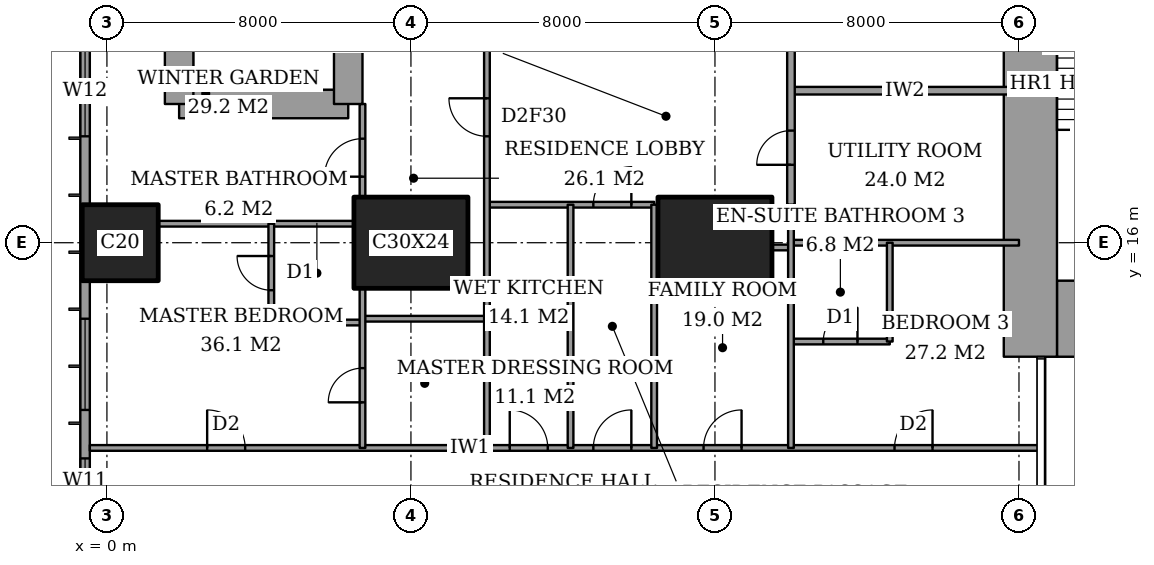
"""IFC4 building model, lengths in metres.
Left out: names, types, materials, properties, quantities, classifications, styles, units other than length and angle.
Written with IfcOpenShell. Run it as: python <this file> out.ifc"""

import sys

from ifc_helpers import new_model, si_unit, direction, frame, frame_2d, origin, origin_2d, place, context, subcontext, project, spatial, rectangle, extrude, element, fill, save


model = new_model("IFC4")
c1 = context("Model", 3, precision=1e-05, world=origin(), true_north=direction((0.0, 1.0)))
c2 = subcontext(c1, "Body", "Model", "MODEL_VIEW")
j1 = project(units=[si_unit("LENGTHUNIT", "METRE"), si_unit("PLANEANGLEUNIT", "RADIAN")], contexts=[c1])
p1 = place(None, origin())
s1 = spatial("IfcSite", under=j1, at=p1, CompositionType="ELEMENT")
p2 = place(p1, origin())
s2 = spatial("IfcBuilding", under=s1, at=p2, CompositionType="ELEMENT")
p3 = place(p2, frame((0.0, 0.0, 135.8)))
s3 = spatial("IfcBuildingStorey", under=s2, at=p3, CompositionType="ELEMENT", Elevation=135.8)
p4 = place(p3, frame((0.35, 16.0, 0.0), z_axis=(0.0, 0.0, 1.0), x_axis=(1.0, 0.0, 0.0)))
e1 = element("IfcColumn", 1, at=p4, inside=s3, PredefinedType="COLUMN", context=c2, shape_type="SweptSolid", body=[
    extrude(rectangle(XDim=2.0, YDim=2.0, at=origin_2d()), origin(), (0.0, 0.0, 1.0), 3.6),
])
for number, where, z_axis, x_axis in (
    (2, (8.0, 16.0, 0.0), (0.0, 0.0, 1.0), (1.0, 0.0, 0.0)),
    (3, (16.0, 16.0, 0.0), (0.0, 0.0, 1.0), (1.0, 0.0, 0.0)),
):
    element("IfcColumn", number, at=place(p3, frame(where, z_axis=z_axis, x_axis=x_axis)), inside=s3, PredefinedType="COLUMN", context=c2, shape_type="SweptSolid", body=[
        extrude(rectangle(XDim=3.0, YDim=2.4, at=origin_2d()), origin(), (0.0, 0.0, 1.0), 3.6),
    ])
p5 = place(p3, frame((25.0, 14.0, 0.0), z_axis=(0.0, 0.0, 1.0), x_axis=(1.0, 0.0, 0.0)))
e4 = element("IfcWall", 4, at=p5, inside=s3, PredefinedType="SHEAR", context=c2, shape_type="SweptSolid", body=[
    extrude(rectangle(XDim=3.15, YDim=2.0, at=frame_2d((1.575, 0.0))), origin(), (0.0, 0.0, 1.0), 3.6),
])
p6 = place(p3, frame((24.3, 13.0, 0.0), z_axis=(0.0, 0.0, 1.0), x_axis=(0.0, 1.0, 0.0)))
e5 = element("IfcWall", 5, at=p6, inside=s3, PredefinedType="SHEAR", context=c2, shape_type="SweptSolid", body=[
    extrude(rectangle(XDim=10.15, YDim=1.4, at=frame_2d((5.075, 0.0))), origin(), (0.0, 0.0, 1.0), 3.6),
])
p7 = place(p3, frame((1.9, 19.65, 0.0), z_axis=(0.0, 0.0, 1.0), x_axis=(1.0, 0.0, 0.0)))
e6 = element("IfcWall", 6, at=p7, inside=s3, PredefinedType="SHEAR", context=c2, shape_type="SweptSolid", body=[
    extrude(rectangle(XDim=4.45, YDim=0.75, at=frame_2d((2.225, 0.0))), origin(), (0.0, 0.0, 1.0), 3.6),
])
p8 = place(p3, frame((6.35, 19.65, 0.0), z_axis=(0.0, 0.0, 1.0), x_axis=(0.0, 1.0, 0.0)))
e7 = element("IfcWall", 7, at=p8, inside=s3, PredefinedType="SHEAR", context=c2, shape_type="SweptSolid", body=[
    extrude(rectangle(XDim=8.7, YDim=0.75, at=frame_2d((4.35, 0.0))), origin(), (0.0, 0.0, 1.0), 3.6),
])
p9 = place(p8, frame((6.725, 0.0, 0.0)))
e8 = element("IfcOpeningElement", 8, at=p9, cuts=e7, PredefinedType="OPENING", context=c2, shape_type="SweptSolid", body=[
    extrude(rectangle(XDim=1.0, YDim=2.1, at=frame_2d((0.5, 1.05))), frame((0.0, 0.385, 0.0), z_axis=(0.0, -1.0, 0.0), x_axis=(1.0, 0.0, 0.0)), (0.0, 0.0, 1.0), 0.77),
])
p10 = place(p3, frame((1.9, 28.35, 0.0), z_axis=(0.0, 0.0, 1.0), x_axis=(0.0, -1.0, 0.0)))
e9 = element("IfcWall", 9, at=p10, inside=s3, PredefinedType="SHEAR", context=c2, shape_type="SweptSolid", body=[
    extrude(rectangle(XDim=8.7, YDim=0.75, at=frame_2d((4.35, 0.0))), origin(), (0.0, 0.0, 1.0), 3.6),
])
p11 = place(p3, frame((-0.575, 44.825, 0.0), z_axis=(0.0, 0.0, 1.0), x_axis=(0.0, -1.0, 0.0)))
e10 = element("IfcWall", 10, at=p11, inside=s3, PredefinedType="SOLIDWALL", context=c2, shape_type="SweptSolid", body=[
    extrude(rectangle(XDim=41.65, YDim=0.25, at=frame_2d((20.825, 0.0))), origin(), (0.0, 0.0, 1.0), 3.6),
])
p12 = place(p11, frame((0.775, 0.0, 0.4)))
e11 = element("IfcOpeningElement", 11, at=p12, cuts=e10, PredefinedType="OPENING", context=c2, shape_type="SweptSolid", body=[
    extrude(rectangle(XDim=2.4, YDim=2.2, at=frame_2d((1.2, 1.1))), frame((0.0, 0.135, 0.0), z_axis=(0.0, -1.0, 0.0), x_axis=(1.0, 0.0, 0.0)), (0.0, 0.0, 1.0), 0.27),
])
p13 = place(p11, frame((6.1, 0.0, 0.4)))
e12 = element("IfcOpeningElement", 12, at=p13, cuts=e10, PredefinedType="OPENING", context=c2, shape_type="SweptSolid", body=[
    extrude(rectangle(XDim=1.2, YDim=2.2, at=frame_2d((0.6, 1.1))), frame((0.0, 0.135, 0.0), z_axis=(0.0, -1.0, 0.0), x_axis=(1.0, 0.0, 0.0)), (0.0, 0.0, 1.0), 0.27),
])
p14 = place(p11, frame((8.425, 0.0, 0.4)))
e13 = element("IfcOpeningElement", 13, at=p14, cuts=e10, PredefinedType="OPENING", context=c2, shape_type="SweptSolid", body=[
    extrude(rectangle(XDim=2.4, YDim=2.2, at=frame_2d((1.2, 1.1))), frame((0.0, 0.135, 0.0), z_axis=(0.0, -1.0, 0.0), x_axis=(1.0, 0.0, 0.0)), (0.0, 0.0, 1.0), 0.27),
])
p15 = place(p11, frame((15.625, 0.0, 0.4)))
e14 = element("IfcOpeningElement", 14, at=p15, cuts=e10, PredefinedType="OPENING", context=c2, shape_type="SweptSolid", body=[
    extrude(rectangle(XDim=2.4, YDim=2.2, at=frame_2d((1.2, 1.1))), frame((0.0, 0.135, 0.0), z_axis=(0.0, -1.0, 0.0), x_axis=(1.0, 0.0, 0.0)), (0.0, 0.0, 1.0), 0.27),
])
p16 = place(p11, frame((23.625, 0.0, 0.4)))
e15 = element("IfcOpeningElement", 15, at=p16, cuts=e10, PredefinedType="OPENING", context=c2, shape_type="SweptSolid", body=[
    extrude(rectangle(XDim=2.4, YDim=2.2, at=frame_2d((1.2, 1.1))), frame((0.0, 0.135, 0.0), z_axis=(0.0, -1.0, 0.0), x_axis=(1.0, 0.0, 0.0)), (0.0, 0.0, 1.0), 0.27),
])
p17 = place(p11, frame((30.825, 0.0, 0.4)))
e16 = element("IfcOpeningElement", 16, at=p17, cuts=e10, PredefinedType="OPENING", context=c2, shape_type="SweptSolid", body=[
    extrude(rectangle(XDim=2.4, YDim=2.2, at=frame_2d((1.2, 1.1))), frame((0.0, 0.135, 0.0), z_axis=(0.0, -1.0, 0.0), x_axis=(1.0, 0.0, 0.0)), (0.0, 0.0, 1.0), 0.27),
])
p18 = place(p11, frame((34.5, 0.0, 0.4)))
e17 = element("IfcOpeningElement", 17, at=p18, cuts=e10, PredefinedType="OPENING", context=c2, shape_type="SweptSolid", body=[
    extrude(rectangle(XDim=1.2, YDim=2.2, at=frame_2d((0.6, 1.1))), frame((0.0, 0.135, 0.0), z_axis=(0.0, -1.0, 0.0), x_axis=(1.0, 0.0, 0.0)), (0.0, 0.0, 1.0), 0.27),
])
p19 = place(p11, frame((38.475, 0.0, 0.4)))
e18 = element("IfcOpeningElement", 18, at=p19, cuts=e10, PredefinedType="OPENING", context=c2, shape_type="SweptSolid", body=[
    extrude(rectangle(XDim=2.4, YDim=2.2, at=frame_2d((1.2, 1.1))), frame((0.0, 0.135, 0.0), z_axis=(0.0, -1.0, 0.0), x_axis=(1.0, 0.0, 0.0)), (0.0, 0.0, 1.0), 0.27),
])
p20 = place(p3, frame((-0.45, 10.6, 0.0), z_axis=(0.0, 0.0, 1.0), x_axis=(1.0, 0.0, 0.0)))
e19 = element("IfcWall", 19, at=p20, inside=s3, PredefinedType="PARTITIONING", context=c2, shape_type="SweptSolid", body=[
    extrude(rectangle(XDim=25.011, YDim=0.15, at=frame_2d((12.505, 0.0))), origin(), (0.0, 0.0, 1.0), 3.35),
])
p21 = place(p20, frame((13.25, 0.0, 0.0)))
e20 = element("IfcOpeningElement", 20, at=p21, cuts=e19, PredefinedType="OPENING", context=c2, shape_type="SweptSolid", body=[
    extrude(rectangle(XDim=1.0, YDim=2.1, at=frame_2d((0.5, 1.05))), frame((0.0, 0.085, 0.0), z_axis=(0.0, -1.0, 0.0), x_axis=(1.0, 0.0, 0.0)), (0.0, 0.0, 1.0), 0.17),
])
p22 = place(p20, frame((3.087, 0.0, 0.0)))
e21 = element("IfcOpeningElement", 21, at=p22, cuts=e19, PredefinedType="OPENING", context=c2, shape_type="SweptSolid", body=[
    extrude(rectangle(XDim=1.0, YDim=2.1, at=frame_2d((0.5, 1.05))), frame((0.0, 0.085, 0.0), z_axis=(0.0, -1.0, 0.0), x_axis=(1.0, 0.0, 0.0)), (0.0, 0.0, 1.0), 0.17),
])
p23 = place(p20, frame((11.05, 0.0, 0.0)))
e22 = element("IfcOpeningElement", 22, at=p23, cuts=e19, PredefinedType="OPENING", context=c2, shape_type="SweptSolid", body=[
    extrude(rectangle(XDim=1.0, YDim=2.1, at=frame_2d((0.5, 1.05))), frame((0.0, 0.085, 0.0), z_axis=(0.0, -1.0, 0.0), x_axis=(1.0, 0.0, 0.0)), (0.0, 0.0, 1.0), 0.17),
])
p24 = place(p20, frame((16.15, 0.0, 0.0)))
e23 = element("IfcOpeningElement", 23, at=p24, cuts=e19, PredefinedType="OPENING", context=c2, shape_type="SweptSolid", body=[
    extrude(rectangle(XDim=1.0, YDim=2.1, at=frame_2d((0.5, 1.05))), frame((0.0, 0.085, 0.0), z_axis=(0.0, -1.0, 0.0), x_axis=(1.0, 0.0, 0.0)), (0.0, 0.0, 1.0), 0.17),
])
p25 = place(p20, frame((21.175, 0.0, 0.0)))
e24 = element("IfcOpeningElement", 24, at=p25, cuts=e19, PredefinedType="OPENING", context=c2, shape_type="SweptSolid", body=[
    extrude(rectangle(XDim=1.0, YDim=2.1, at=frame_2d((0.5, 1.05))), frame((0.0, 0.085, 0.0), z_axis=(0.0, -1.0, 0.0), x_axis=(1.0, 0.0, 0.0)), (0.0, 0.0, 1.0), 0.17),
])
p26 = place(p3, frame((18.0, 13.4, 0.0), z_axis=(0.0, 0.0, 1.0), x_axis=(1.0, 0.0, 0.0)))
e25 = element("IfcWall", 25, at=p26, inside=s3, PredefinedType="PARTITIONING", context=c2, shape_type="SweptSolid", body=[
    extrude(rectangle(XDim=2.6, YDim=0.15, at=frame_2d((1.3, 0.0))), origin(), (0.0, 0.0, 1.0), 3.35),
])
p27 = place(p26, frame((0.85, 0.0, 0.0)))
e26 = element("IfcOpeningElement", 26, at=p27, cuts=e25, PredefinedType="OPENING", context=c2, shape_type="SweptSolid", body=[
    extrude(rectangle(XDim=0.9, YDim=2.1, at=frame_2d((0.45, 1.05))), frame((0.0, 0.085, 0.0), z_axis=(0.0, -1.0, 0.0), x_axis=(1.0, 0.0, 0.0)), (0.0, 0.0, 1.0), 0.17),
])
p28 = place(p3, frame((4.325, 13.9, 0.0), z_axis=(0.0, 0.0, 1.0), x_axis=(1.0, 0.0, 0.0)))
e27 = element("IfcWall", 27, at=p28, inside=s3, PredefinedType="PARTITIONING", context=c2, shape_type="SweptSolid", body=[
    extrude(rectangle(XDim=2.4, YDim=0.15, at=frame_2d((1.2, 0.0))), origin(), (0.0, 0.0, 1.0), 3.35),
])
p29 = place(p3, frame((6.725, 14.0, 0.0), z_axis=(0.0, 0.0, 1.0), x_axis=(1.0, 0.0, 0.0)))
e28 = element("IfcWall", 28, at=p29, inside=s3, PredefinedType="PARTITIONING", context=c2, shape_type="SweptSolid", body=[
    extrude(rectangle(XDim=3.275, YDim=0.15, at=frame_2d((1.637, 0.0))), origin(), (0.0, 0.0, 1.0), 3.35),
])
p30 = place(p3, frame((17.5, 15.875, 0.0), z_axis=(0.0, 0.0, 1.0), x_axis=(1.0, 0.0, 0.0)))
e29 = element("IfcWall", 29, at=p30, inside=s3, PredefinedType="PARTITIONING", context=c2, shape_type="SweptSolid", body=[
    extrude(rectangle(XDim=0.5, YDim=0.15, at=frame_2d((0.25, 0.0))), origin(), (0.0, 0.0, 1.0), 2.634),
])
p31 = place(p3, frame((18.0, 16.0, 0.0), z_axis=(0.0, 0.0, 1.0), x_axis=(1.0, 0.0, 0.0)))
e30 = element("IfcWall", 30, at=p31, inside=s3, PredefinedType="PARTITIONING", context=c2, shape_type="SweptSolid", body=[
    extrude(rectangle(XDim=6.0, YDim=0.15, at=frame_2d((3.0, 0.0))), origin(), (0.0, 0.0, 1.0), 2.634),
])
p32 = place(p3, frame((1.35, 16.5, 0.0), z_axis=(0.0, 0.0, 1.0), x_axis=(1.0, 0.0, 0.0)))
e31 = element("IfcWall", 31, at=p32, inside=s3, PredefinedType="PARTITIONING", context=c2, shape_type="SweptSolid", body=[
    extrude(rectangle(XDim=5.15, YDim=0.15, at=frame_2d((2.575, 0.0))), origin(), (0.0, 0.0, 1.0), 3.35),
])
p33 = place(p3, frame((10.0, 17.0, 0.0), z_axis=(0.0, 0.0, 1.0), x_axis=(1.0, 0.0, 0.0)))
e32 = element("IfcWall", 32, at=p33, inside=s3, PredefinedType="PARTITIONING", context=c2, shape_type="SweptSolid", body=[
    extrude(rectangle(XDim=4.4, YDim=0.15, at=frame_2d((2.2, 0.0))), origin(), (0.0, 0.0, 1.0), 3.35),
])
p34 = place(p33, frame((2.8, 0.0, 0.0)))
e33 = element("IfcOpeningElement", 33, at=p34, cuts=e32, PredefinedType="OPENING", context=c2, shape_type="SweptSolid", body=[
    extrude(rectangle(XDim=1.0, YDim=2.1, at=frame_2d((0.5, 1.05))), frame((0.0, 0.085, 0.0), z_axis=(0.0, -1.0, 0.0), x_axis=(1.0, 0.0, 0.0)), (0.0, 0.0, 1.0), 0.17),
])
p35 = place(p3, frame((18.0, 20.0, 0.0), z_axis=(0.0, 0.0, 1.0), x_axis=(1.0, 0.0, 0.0)))
e34 = element("IfcWall", 34, at=p35, inside=s3, PredefinedType="PARTITIONING", context=c2, shape_type="SweptSolid", body=[
    extrude(rectangle(XDim=6.0, YDim=0.2, at=frame_2d((3.0, 0.0))), origin(), (0.0, 0.0, 1.0), 3.35),
])
p36 = place(p3, frame((4.325, 13.9, 0.0), z_axis=(0.0, 0.0, 1.0), x_axis=(0.0, 1.0, 0.0)))
e35 = element("IfcWall", 35, at=p36, inside=s3, PredefinedType="PARTITIONING", context=c2, shape_type="SweptSolid", body=[
    extrude(rectangle(XDim=2.6, YDim=0.15, at=frame_2d((1.3, 0.0))), origin(), (0.0, 0.0, 1.0), 3.35),
])
p37 = place(p36, frame((0.85, 0.0, 0.0)))
e36 = element("IfcOpeningElement", 36, at=p37, cuts=e35, PredefinedType="OPENING", context=c2, shape_type="SweptSolid", body=[
    extrude(rectangle(XDim=0.9, YDim=2.1, at=frame_2d((0.45, 1.05))), frame((0.0, 0.085, 0.0), z_axis=(0.0, -1.0, 0.0), x_axis=(1.0, 0.0, 0.0)), (0.0, 0.0, 1.0), 0.17),
])
p38 = place(p3, frame((6.725, 10.6, 0.0), z_axis=(0.0, 0.0, 1.0), x_axis=(0.0, 1.0, 0.0)))
e37 = element("IfcWall", 37, at=p38, inside=s3, PredefinedType="PARTITIONING", context=c2, shape_type="SweptSolid", body=[
    extrude(rectangle(XDim=4.2, YDim=0.15, at=frame_2d((2.1, 0.0))), origin(), (0.0, 0.0, 1.0), 3.35),
])
p39 = place(p38, frame((1.2, 0.0, 0.0)))
e38 = element("IfcOpeningElement", 38, at=p39, cuts=e37, PredefinedType="OPENING", context=c2, shape_type="SweptSolid", body=[
    extrude(rectangle(XDim=0.9, YDim=2.1, at=frame_2d((0.45, 1.05))), frame((0.0, 0.085, 0.0), z_axis=(0.0, -1.0, 0.0), x_axis=(1.0, 0.0, 0.0)), (0.0, 0.0, 1.0), 0.17),
])
p40 = place(p3, frame((6.725, 17.2, 0.0), z_axis=(0.0, 0.0, 1.0), x_axis=(0.0, 1.0, 0.0)))
e39 = element("IfcWall", 39, at=p40, inside=s3, PredefinedType="PARTITIONING", context=c2, shape_type="SweptSolid", body=[
    extrude(rectangle(XDim=2.45, YDim=0.15, at=frame_2d((1.225, 0.0))), origin(), (0.0, 0.0, 1.0), 3.35),
])
p41 = place(p40, frame((0.538, 0.0, 0.0)))
e40 = element("IfcOpeningElement", 40, at=p41, cuts=e39, PredefinedType="OPENING", context=c2, shape_type="SweptSolid", body=[
    extrude(rectangle(XDim=1.0, YDim=2.1, at=frame_2d((0.5, 1.05))), frame((0.0, 0.085, 0.0), z_axis=(0.0, -1.0, 0.0), x_axis=(1.0, 0.0, 0.0)), (0.0, 0.0, 1.0), 0.17),
])
p42 = place(p3, frame((10.0, 10.6, 0.0), z_axis=(0.0, 0.0, 1.0), x_axis=(0.0, 1.0, 0.0)))
e41 = element("IfcWall", 41, at=p42, inside=s3, PredefinedType="PARTITIONING", context=c2, shape_type="SweptSolid", body=[
    extrude(rectangle(XDim=11.0, YDim=0.15, at=frame_2d((5.5, 0.0))), origin(), (0.0, 0.0, 1.0), 3.35),
])
p43 = place(p42, frame((8.2, 0.0, 0.0)))
e42 = element("IfcOpeningElement", 42, at=p43, cuts=e41, PredefinedType="OPENING", context=c2, shape_type="SweptSolid", body=[
    extrude(rectangle(XDim=1.0, YDim=2.1, at=frame_2d((0.5, 1.05))), frame((0.0, 0.085, 0.0), z_axis=(0.0, -1.0, 0.0), x_axis=(1.0, 0.0, 0.0)), (0.0, 0.0, 1.0), 0.17),
])
for number, where, z_axis, x_axis in (
    (43, (12.2, 10.6, 0.0), (0.0, 0.0, 1.0), (0.0, 1.0, 0.0)),
    (44, (14.4, 10.6, 0.0), (0.0, 0.0, 1.0), (0.0, 1.0, 0.0)),
):
    element("IfcWall", number, at=place(p3, frame(where, z_axis=z_axis, x_axis=x_axis)), inside=s3, PredefinedType="PARTITIONING", context=c2, shape_type="SweptSolid", body=[
        extrude(rectangle(XDim=6.4, YDim=0.15, at=frame_2d((3.2, 0.0))), origin(), (0.0, 0.0, 1.0), 3.35),
    ])
p44 = place(p3, frame((18.0, 17.0, 0.0), z_axis=(0.0, 0.0, 1.0), x_axis=(0.0, 1.0, 0.0)))
e45 = element("IfcWall", 45, at=p44, inside=s3, PredefinedType="PARTITIONING", context=c2, shape_type="SweptSolid", body=[
    extrude(rectangle(XDim=7.0, YDim=0.2, at=frame_2d((3.5, 0.0))), origin(), (0.0, 0.0, 1.0), 3.35),
])
p45 = place(p44, frame((4.4, 0.0, 0.0)))
e46 = element("IfcOpeningElement", 46, at=p45, cuts=e45, PredefinedType="OPENING", context=c2, shape_type="SweptSolid", body=[
    extrude(rectangle(XDim=1.2, YDim=2.4, at=frame_2d((0.6, 1.2))), frame((0.0, 0.11, 0.0), z_axis=(0.0, -1.0, 0.0), x_axis=(1.0, 0.0, 0.0)), (0.0, 0.0, 1.0), 0.22),
])
p46 = place(p44, frame((1.05, 0.0, 0.0)))
e47 = element("IfcOpeningElement", 47, at=p46, cuts=e45, PredefinedType="OPENING", context=c2, shape_type="SweptSolid", body=[
    extrude(rectangle(XDim=0.9, YDim=2.1, at=frame_2d((0.45, 1.05))), frame((0.0, 0.11, 0.0), z_axis=(0.0, -1.0, 0.0), x_axis=(1.0, 0.0, 0.0)), (0.0, 0.0, 1.0), 0.22),
])
p47 = place(p3, frame((18.0, 10.6, 0.0), z_axis=(0.0, 0.0, 1.0), x_axis=(0.0, 1.0, 0.0)))
e48 = element("IfcWall", 48, at=p47, inside=s3, PredefinedType="PARTITIONING", context=c2, shape_type="SweptSolid", body=[
    extrude(rectangle(XDim=6.4, YDim=0.15, at=frame_2d((3.2, 0.0))), origin(), (0.0, 0.0, 1.0), 3.35),
])
p48 = place(p3, frame((20.6, 13.4, 0.0), z_axis=(0.0, 0.0, 1.0), x_axis=(0.0, 1.0, 0.0)))
e49 = element("IfcWall", 49, at=p48, inside=s3, PredefinedType="PARTITIONING", context=c2, shape_type="SweptSolid", body=[
    extrude(rectangle(XDim=2.6, YDim=0.15, at=frame_2d((1.3, 0.0))), origin(), (0.0, 0.0, 1.0), 3.35),
])
p49 = place(p16, origin())
e50 = element("IfcWindow", 50, at=p49, inside=s3, PartitioningType="SINGLE_PANEL", PredefinedType="WINDOW", context=c2, shape_type="SweptSolid", body=[
    extrude(rectangle(XDim=2.4, YDim=2.2, at=frame_2d((1.2, 1.1))), frame((0.0, 0.03, 0.0), z_axis=(0.0, -1.0, 0.0), x_axis=(1.0, 0.0, 0.0)), (0.0, 0.0, 1.0), 0.06),
])
fill(e15, e50)
p50 = place(p17, origin())
e51 = element("IfcWindow", 51, at=p50, inside=s3, PartitioningType="SINGLE_PANEL", PredefinedType="WINDOW", context=c2, shape_type="SweptSolid", body=[
    extrude(rectangle(XDim=2.4, YDim=2.2, at=frame_2d((1.2, 1.1))), frame((0.0, 0.03, 0.0), z_axis=(0.0, -1.0, 0.0), x_axis=(1.0, 0.0, 0.0)), (0.0, 0.0, 1.0), 0.06),
])
fill(e16, e51)
p51 = place(p18, origin())
e52 = element("IfcWindow", 52, at=p51, inside=s3, PartitioningType="SINGLE_PANEL", PredefinedType="WINDOW", context=c2, shape_type="SweptSolid", body=[
    extrude(rectangle(XDim=1.2, YDim=2.2, at=frame_2d((0.6, 1.1))), frame((0.0, 0.03, 0.0), z_axis=(0.0, -1.0, 0.0), x_axis=(1.0, 0.0, 0.0)), (0.0, 0.0, 1.0), 0.06),
])
fill(e17, e52)
p52 = place(p21, origin())
e53 = element("IfcDoor", 53, at=p52, inside=s3, OperationType="SINGLE_SWING_LEFT", PredefinedType="DOOR", context=c2, shape_type="SweptSolid", body=[
    extrude(rectangle(XDim=1.0, YDim=2.1, at=frame_2d((0.5, 1.05))), frame((0.0, 0.025, 0.0), z_axis=(0.0, -1.0, 0.0), x_axis=(1.0, 0.0, 0.0)), (0.0, 0.0, 1.0), 0.05),
])
fill(e20, e53)
p53 = place(p37, origin())
e54 = element("IfcDoor", 54, at=p53, inside=s3, OperationType="SINGLE_SWING_LEFT", PredefinedType="DOOR", context=c2, shape_type="SweptSolid", body=[
    extrude(rectangle(XDim=0.9, YDim=2.1, at=frame_2d((0.45, 1.05))), frame((0.0, 0.025, 0.0), z_axis=(0.0, -1.0, 0.0), x_axis=(1.0, 0.0, 0.0)), (0.0, 0.0, 1.0), 0.05),
])
fill(e36, e54)
p54 = place(p22, origin())
e55 = element("IfcDoor", 55, at=p54, inside=s3, OperationType="SINGLE_SWING_RIGHT", PredefinedType="DOOR", context=c2, shape_type="SweptSolid", body=[
    extrude(rectangle(XDim=1.0, YDim=2.1, at=frame_2d((0.5, 1.05))), frame((0.0, 0.025, 0.0), z_axis=(0.0, -1.0, 0.0), x_axis=(1.0, 0.0, 0.0)), (0.0, 0.0, 1.0), 0.05),
])
fill(e21, e55)
p55 = place(p41, origin())
e56 = element("IfcDoor", 56, at=p55, inside=s3, OperationType="SINGLE_SWING_RIGHT", PredefinedType="DOOR", context=c2, shape_type="SweptSolid", body=[
    extrude(rectangle(XDim=1.0, YDim=2.1, at=frame_2d((0.5, 1.05))), frame((0.0, 0.025, 0.0), z_axis=(0.0, -1.0, 0.0), x_axis=(1.0, 0.0, 0.0)), (0.0, 0.0, 1.0), 0.05),
])
fill(e40, e56)
p56 = place(p39, origin())
e57 = element("IfcDoor", 57, at=p56, inside=s3, OperationType="SINGLE_SWING_RIGHT", PredefinedType="DOOR", context=c2, shape_type="SweptSolid", body=[
    extrude(rectangle(XDim=0.9, YDim=2.1, at=frame_2d((0.45, 1.05))), frame((0.0, 0.025, 0.0), z_axis=(0.0, -1.0, 0.0), x_axis=(1.0, 0.0, 0.0)), (0.0, 0.0, 1.0), 0.05),
])
fill(e38, e57)
p57 = place(p43, origin())
e58 = element("IfcDoor", 58, at=p57, inside=s3, OperationType="SINGLE_SWING_LEFT", PredefinedType="DOOR", context=c2, shape_type="SweptSolid", body=[
    extrude(rectangle(XDim=1.0, YDim=2.1, at=frame_2d((0.5, 1.05))), frame((0.0, 0.025, 0.0), z_axis=(0.0, -1.0, 0.0), x_axis=(1.0, 0.0, 0.0)), (0.0, 0.0, 1.0), 0.05),
])
fill(e42, e58)
p58 = place(p23, origin())
e59 = element("IfcDoor", 59, at=p58, inside=s3, OperationType="SINGLE_SWING_RIGHT", PredefinedType="DOOR", context=c2, shape_type="SweptSolid", body=[
    extrude(rectangle(XDim=1.0, YDim=2.1, at=frame_2d((0.5, 1.05))), frame((0.0, 0.025, 0.0), z_axis=(0.0, -1.0, 0.0), x_axis=(1.0, 0.0, 0.0)), (0.0, 0.0, 1.0), 0.05),
])
fill(e22, e59)
p59 = place(p34, origin())
e60 = element("IfcDoor", 60, at=p59, inside=s3, OperationType="SINGLE_SWING_LEFT", PredefinedType="DOOR", context=c2, shape_type="SweptSolid", body=[
    extrude(rectangle(XDim=1.0, YDim=2.1, at=frame_2d((0.5, 1.05))), frame((0.0, 0.025, 0.0), z_axis=(0.0, -1.0, 0.0), x_axis=(1.0, 0.0, 0.0)), (0.0, 0.0, 1.0), 0.05),
])
fill(e33, e60)
p60 = place(p24, origin())
e61 = element("IfcDoor", 61, at=p60, inside=s3, OperationType="SINGLE_SWING_LEFT", PredefinedType="DOOR", context=c2, shape_type="SweptSolid", body=[
    extrude(rectangle(XDim=1.0, YDim=2.1, at=frame_2d((0.5, 1.05))), frame((0.0, 0.025, 0.0), z_axis=(0.0, -1.0, 0.0), x_axis=(1.0, 0.0, 0.0)), (0.0, 0.0, 1.0), 0.05),
])
fill(e23, e61)
p61 = place(p27, origin())
e62 = element("IfcDoor", 62, at=p61, inside=s3, OperationType="SINGLE_SWING_LEFT", PredefinedType="DOOR", context=c2, shape_type="SweptSolid", body=[
    extrude(rectangle(XDim=0.9, YDim=2.1, at=frame_2d((0.45, 1.05))), frame((0.0, 0.025, 0.0), z_axis=(0.0, -1.0, 0.0), x_axis=(1.0, 0.0, 0.0)), (0.0, 0.0, 1.0), 0.05),
])
fill(e26, e62)
p62 = place(p25, origin())
e63 = element("IfcDoor", 63, at=p62, inside=s3, OperationType="SINGLE_SWING_LEFT", PredefinedType="DOOR", context=c2, shape_type="SweptSolid", body=[
    extrude(rectangle(XDim=1.0, YDim=2.1, at=frame_2d((0.5, 1.05))), frame((0.0, 0.025, 0.0), z_axis=(0.0, -1.0, 0.0), x_axis=(1.0, 0.0, 0.0)), (0.0, 0.0, 1.0), 0.05),
])
fill(e24, e63)
p63 = place(p46, origin())
e64 = element("IfcDoor", 64, at=p63, inside=s3, OperationType="SINGLE_SWING_RIGHT", PredefinedType="DOOR", context=c2, shape_type="SweptSolid", body=[
    extrude(rectangle(XDim=0.9, YDim=2.1, at=frame_2d((0.45, 1.05))), frame((0.0, 0.025, 0.0), z_axis=(0.0, -1.0, 0.0), x_axis=(1.0, 0.0, 0.0)), (0.0, 0.0, 1.0), 0.05),
])
fill(e47, e64)
save(model, sys.argv[1])
